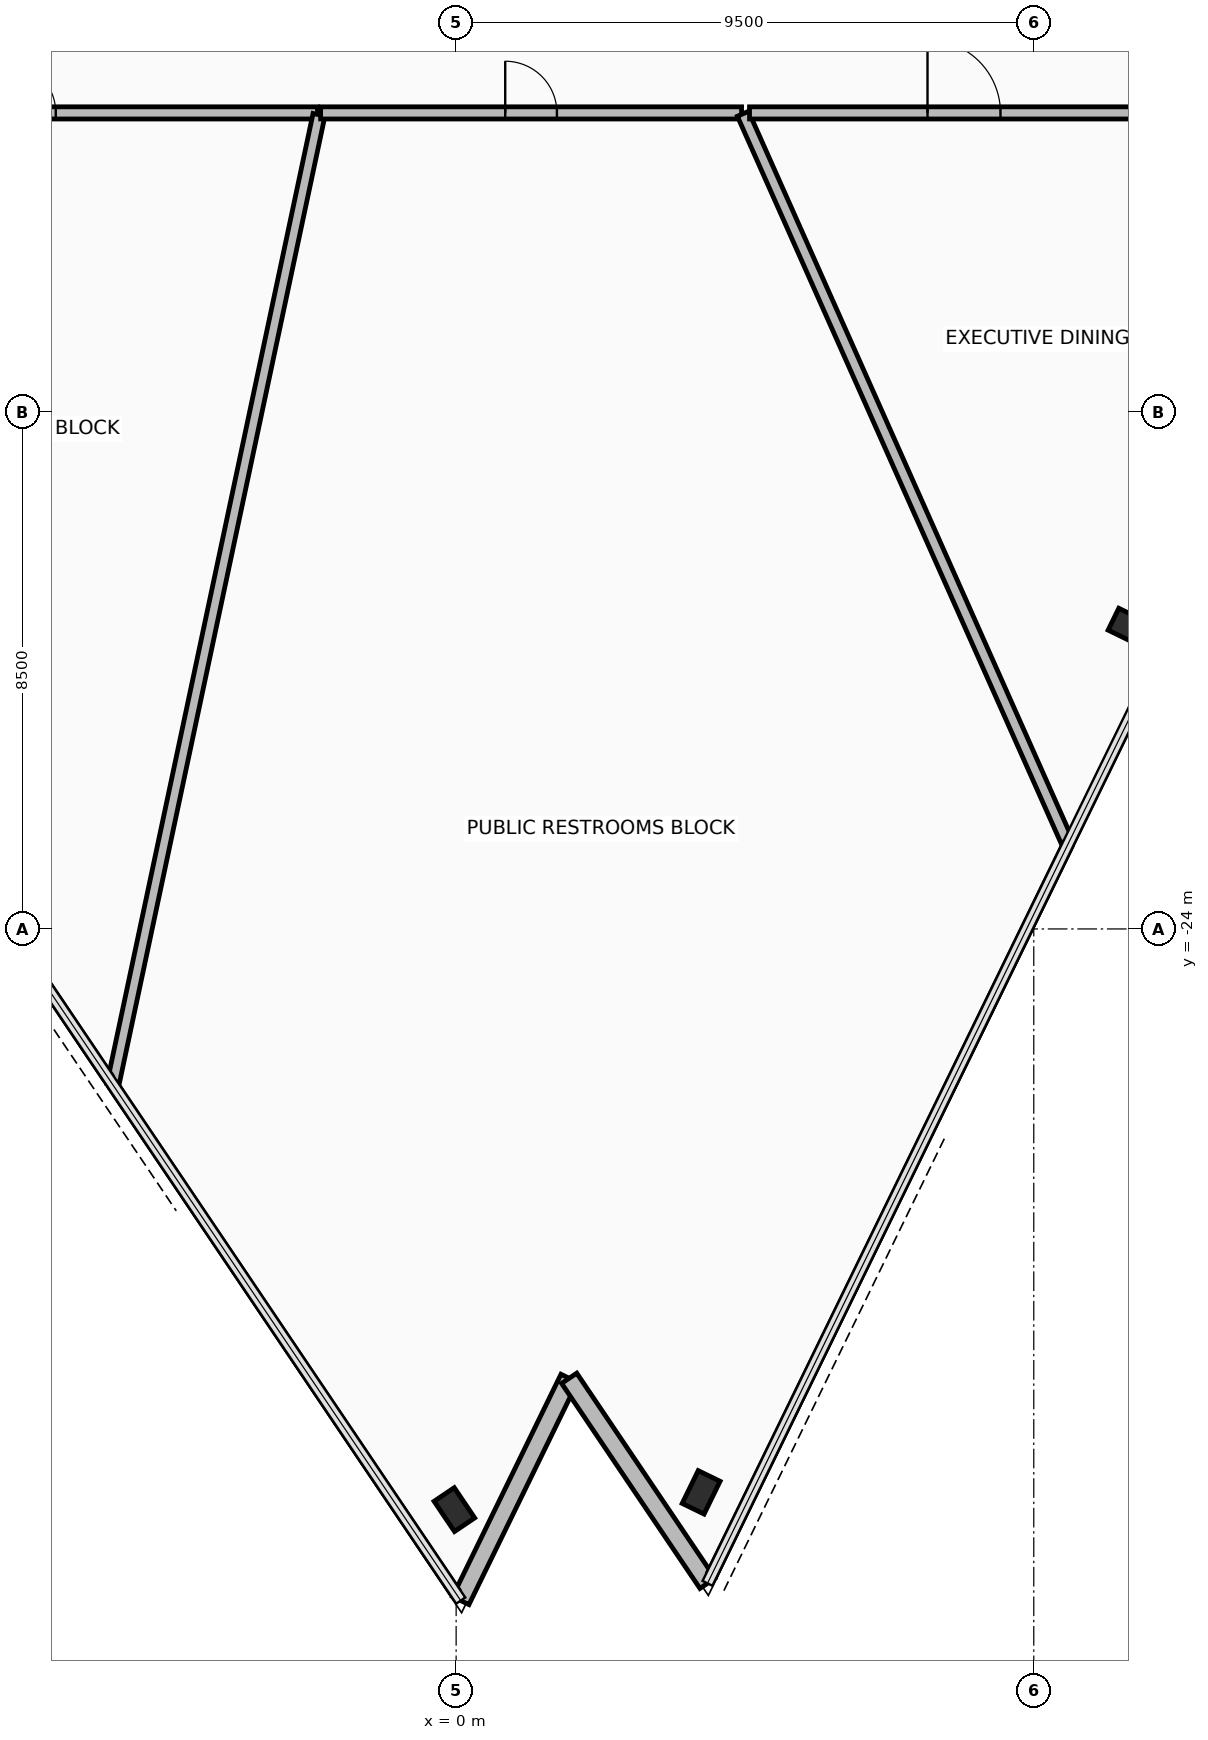
"""IFC4 building model, lengths in metres.
Left out: names, types, materials, properties, quantities, classifications, styles, units other than length and angle.
Written with IfcOpenShell. Run it as: python <this file> out.ifc"""

import sys

from ifc_helpers import new_model, si_unit, direction, frame, frame_2d, origin, origin_2d, place, context, subcontext, project, spatial, rectangle, hollow_rectangle, extrude, element, fill, save


model = new_model("IFC4")
c1 = context("Model", 3, precision=1e-05, world=origin(), true_north=direction((0.0, 1.0)))
c2 = subcontext(c1, "Body", "Model", "MODEL_VIEW")
j1 = project(units=[si_unit("LENGTHUNIT", "METRE"), si_unit("PLANEANGLEUNIT", "RADIAN")], contexts=[c1])
p1 = place(None, origin())
s1 = spatial("IfcSite", under=j1, at=p1, CompositionType="ELEMENT")
p2 = place(p1, origin())
s2 = spatial("IfcBuilding", under=s1, at=p2, CompositionType="ELEMENT")
p3 = place(p2, frame((0.0, 0.0, 253.4)))
s3 = spatial("IfcBuildingStorey", under=s2, at=p3, CompositionType="ELEMENT", Elevation=253.4)
for number, where, z_axis, x_axis in (
    (1, (-0.029, -33.549, 0.0), (0.0, 0.0, 1.0), (-0.559, 0.829, 0.0)),
    (2, (4.029, -33.265, 0.0), (0.0, 0.0, 1.0), (0.438, 0.899, 0.0)),
):
    element("IfcColumn", number, at=place(p3, frame(where, z_axis=z_axis, x_axis=x_axis)), inside=s3, PredefinedType="COLUMN", context=c2, shape_type="SweptSolid", body=[
        extrude(hollow_rectangle(XDim=0.4, YDim=0.6, WallThickness=0.03, at=origin_2d()), origin(), (0.0, 0.0, 1.0), 3.6),
    ])
p4 = place(p3, frame((10.99, -18.994, -0.19), z_axis=(0.0, 0.0, 1.0), x_axis=(0.43837271548, 0.898793281196, 0.0)))
e3 = element("IfcColumn", 3, at=p4, inside=s3, PredefinedType="COLUMN", context=c2, shape_type="SweptSolid", body=[
    extrude(hollow_rectangle(XDim=0.4, YDim=0.4, WallThickness=0.025, at=origin_2d()), origin(), (0.0, 0.0, 1.0), 3.79),
])
p5 = place(p3, frame((0.076, -35.045, 0.0), z_axis=(0.0, 0.0, 1.0), x_axis=(0.438357414153, 0.898800744024, 0.0)))
e4 = element("IfcWall", 4, at=p5, inside=s3, PredefinedType="STANDARD", context=c2, shape_type="SweptSolid", body=[
    extrude(rectangle(XDim=4.068, YDim=0.3, at=frame_2d((2.034, 0.0))), origin(), (0.0, 0.0, 1.0), 2.765),
])
p6 = place(p3, frame((1.859, -31.389, 0.0), z_axis=(0.0, 0.0, 1.0), x_axis=(0.559206900681, -0.829028131145, 0.0)))
e5 = element("IfcWall", 5, at=p6, inside=s3, PredefinedType="STANDARD", context=c2, shape_type="SweptSolid", body=[
    extrude(rectangle(XDim=4.068, YDim=0.3, at=frame_2d((2.034, 0.0))), origin(), (0.0, 0.0, 1.0), 2.765),
])
p7 = place(p3, frame((-11.741, -10.58, 0.0), z_axis=(0.0, 0.0, 1.0), x_axis=(1.0, 0.0, 0.0)))
e6 = element("IfcWall", 6, at=p7, inside=s3, PredefinedType="PARTITIONING", context=c2, shape_type="SweptSolid", body=[
    extrude(rectangle(XDim=9.461, YDim=0.2, at=frame_2d((4.73, 0.0))), origin(), (0.0, 0.0, 1.0), 2.915),
])
p8 = place(p7, frame((4.306, 0.0, 0.0)))
e7 = element("IfcOpeningElement", 7, at=p8, cuts=e6, PredefinedType="OPENING", context=c2, shape_type="SweptSolid", body=[
    extrude(rectangle(XDim=0.85, YDim=2.1, at=frame_2d((0.425, 1.05))), frame((0.0, 0.11, 0.0), z_axis=(0.0, -1.0, 0.0), x_axis=(1.0, 0.0, 0.0)), (0.0, 0.0, 1.0), 0.22),
])
p9 = place(p3, frame((-2.255, -10.61, 0.0), z_axis=(0.0, 0.0, 1.0), x_axis=(-0.207902262157, -0.97814960481, 0.0)))
e8 = element("IfcWall", 8, at=p9, inside=s3, PredefinedType="PARTITIONING", context=c2, shape_type="SweptSolid", body=[
    extrude(rectangle(XDim=16.309, YDim=0.2, at=frame_2d((8.154, 0.0))), origin(), (0.0, 0.0, 1.0), 2.765),
])
p10 = place(p3, frame((-5.728, -26.441, 0.0), z_axis=(0.0, 0.0, 1.0), x_axis=(-0.559188397691, 0.829040611724, 0.0)))
e9 = element("IfcWall", 9, at=p10, inside=s3, PredefinedType="PARTITIONING", context=c2, shape_type="SweptSolid", body=[
    extrude(rectangle(XDim=15.951, YDim=0.15, at=frame_2d((7.976, 0.0))), origin(), (0.0, 0.0, 1.0), 3.42),
])
p11 = place(p3, frame((-0.024, -34.897, 0.0), z_axis=(0.0, 0.0, 1.0), x_axis=(-0.559196847428, 0.829034912309, 0.0)))
e10 = element("IfcWall", 10, at=p11, inside=s3, PredefinedType="PARTITIONING", context=c2, shape_type="SweptSolid", body=[
    extrude(rectangle(XDim=10.043, YDim=0.15, at=frame_2d((5.021, 0.0))), origin(), (0.0, 0.0, 1.0), 3.42),
])
p12 = place(p3, frame((-2.229, -10.58, 0.0), z_axis=(0.0, 0.0, 1.0), x_axis=(1.0, 0.0, 0.0)))
e11 = element("IfcWall", 11, at=p12, inside=s3, PredefinedType="PARTITIONING", context=c2, shape_type="SweptSolid", body=[
    extrude(rectangle(XDim=6.923, YDim=0.2, at=frame_2d((3.461, 0.0))), origin(), (0.0, 0.0, 1.0), 3.42),
])
p13 = place(p12, frame((3.036, 0.0, 0.0)))
e12 = element("IfcOpeningElement", 12, at=p13, cuts=e11, PredefinedType="OPENING", context=c2, shape_type="SweptSolid", body=[
    extrude(rectangle(XDim=0.85, YDim=2.1, at=frame_2d((0.425, 1.05))), frame((0.0, 0.11, 0.0), z_axis=(0.0, -1.0, 0.0), x_axis=(1.0, 0.0, 0.0)), (0.0, 0.0, 1.0), 0.22),
])
p14 = place(p3, frame((4.717, -10.595, 0.0), z_axis=(0.0, 0.0, 1.0), x_axis=(0.406740308305, -0.913543825769, 0.0)))
e13 = element("IfcWall", 13, at=p14, inside=s3, PredefinedType="PARTITIONING", context=c2, shape_type="SweptSolid", body=[
    extrude(rectangle(XDim=13.134, YDim=0.2, at=frame_2d((6.567, 0.0))), origin(), (0.0, 0.0, 1.0), 2.765),
])
p15 = place(p3, frame((10.059, -22.614, 0.0), z_axis=(0.0, 0.0, 1.0), x_axis=(-0.438368087018, -0.898795538643, 0.0)))
e14 = element("IfcWall", 14, at=p15, inside=s3, PredefinedType="PARTITIONING", context=c2, shape_type="SweptSolid", body=[
    extrude(rectangle(XDim=13.336, YDim=0.15, at=frame_2d((6.668, 0.0))), origin(), (0.0, 0.0, 1.0), 3.42),
])
p16 = place(p3, frame((4.825, -10.58, 0.0), z_axis=(0.0, 0.0, 1.0), x_axis=(1.0, 0.0, 0.0)))
e15 = element("IfcWall", 15, at=p16, inside=s3, PredefinedType="PARTITIONING", context=c2, shape_type="SweptSolid", body=[
    extrude(rectangle(XDim=7.054, YDim=0.2, at=frame_2d((3.527, 0.0))), origin(), (0.0, 0.0, 1.0), 2.915),
])
p17 = place(p16, frame((2.927, 0.0, 0.0)))
e16 = element("IfcOpeningElement", 16, at=p17, cuts=e15, PredefinedType="OPENING", context=c2, shape_type="SweptSolid", body=[
    extrude(rectangle(XDim=1.2, YDim=2.15, at=frame_2d((0.6, 1.075))), frame((0.0, 0.11, 0.0), z_axis=(0.0, -1.0, 0.0), x_axis=(1.0, 0.0, 0.0)), (0.0, 0.0, 1.0), 0.22),
])
p18 = place(p8, origin())
e17 = element("IfcDoor", 17, at=p18, inside=s3, OperationType="SINGLE_SWING_RIGHT", PredefinedType="DOOR", context=c2, shape_type="SweptSolid", body=[
    extrude(rectangle(XDim=0.85, YDim=2.1, at=frame_2d((0.425, 1.05))), frame((0.0, 0.025, 0.0), z_axis=(0.0, -1.0, 0.0), x_axis=(1.0, 0.0, 0.0)), (0.0, 0.0, 1.0), 0.05),
])
fill(e7, e17)
p19 = place(p13, origin())
e18 = element("IfcDoor", 18, at=p19, inside=s3, OperationType="SINGLE_SWING_RIGHT", PredefinedType="DOOR", context=c2, shape_type="SweptSolid", body=[
    extrude(rectangle(XDim=0.85, YDim=2.1, at=frame_2d((0.425, 1.05))), frame((0.0, 0.025, 0.0), z_axis=(0.0, -1.0, 0.0), x_axis=(1.0, 0.0, 0.0)), (0.0, 0.0, 1.0), 0.05),
])
fill(e12, e18)
p20 = place(p17, origin())
e19 = element("IfcDoor", 19, at=p20, inside=s3, OperationType="SINGLE_SWING_LEFT", PredefinedType="DOOR", context=c2, shape_type="SweptSolid", body=[
    extrude(rectangle(XDim=1.2, YDim=2.15, at=frame_2d((0.6, 1.075))), frame((0.0, 0.025, 0.0), z_axis=(0.0, -1.0, 0.0), x_axis=(1.0, 0.0, 0.0)), (0.0, 0.0, 1.0), 0.05),
])
fill(e16, e19)
save(model, sys.argv[1])
